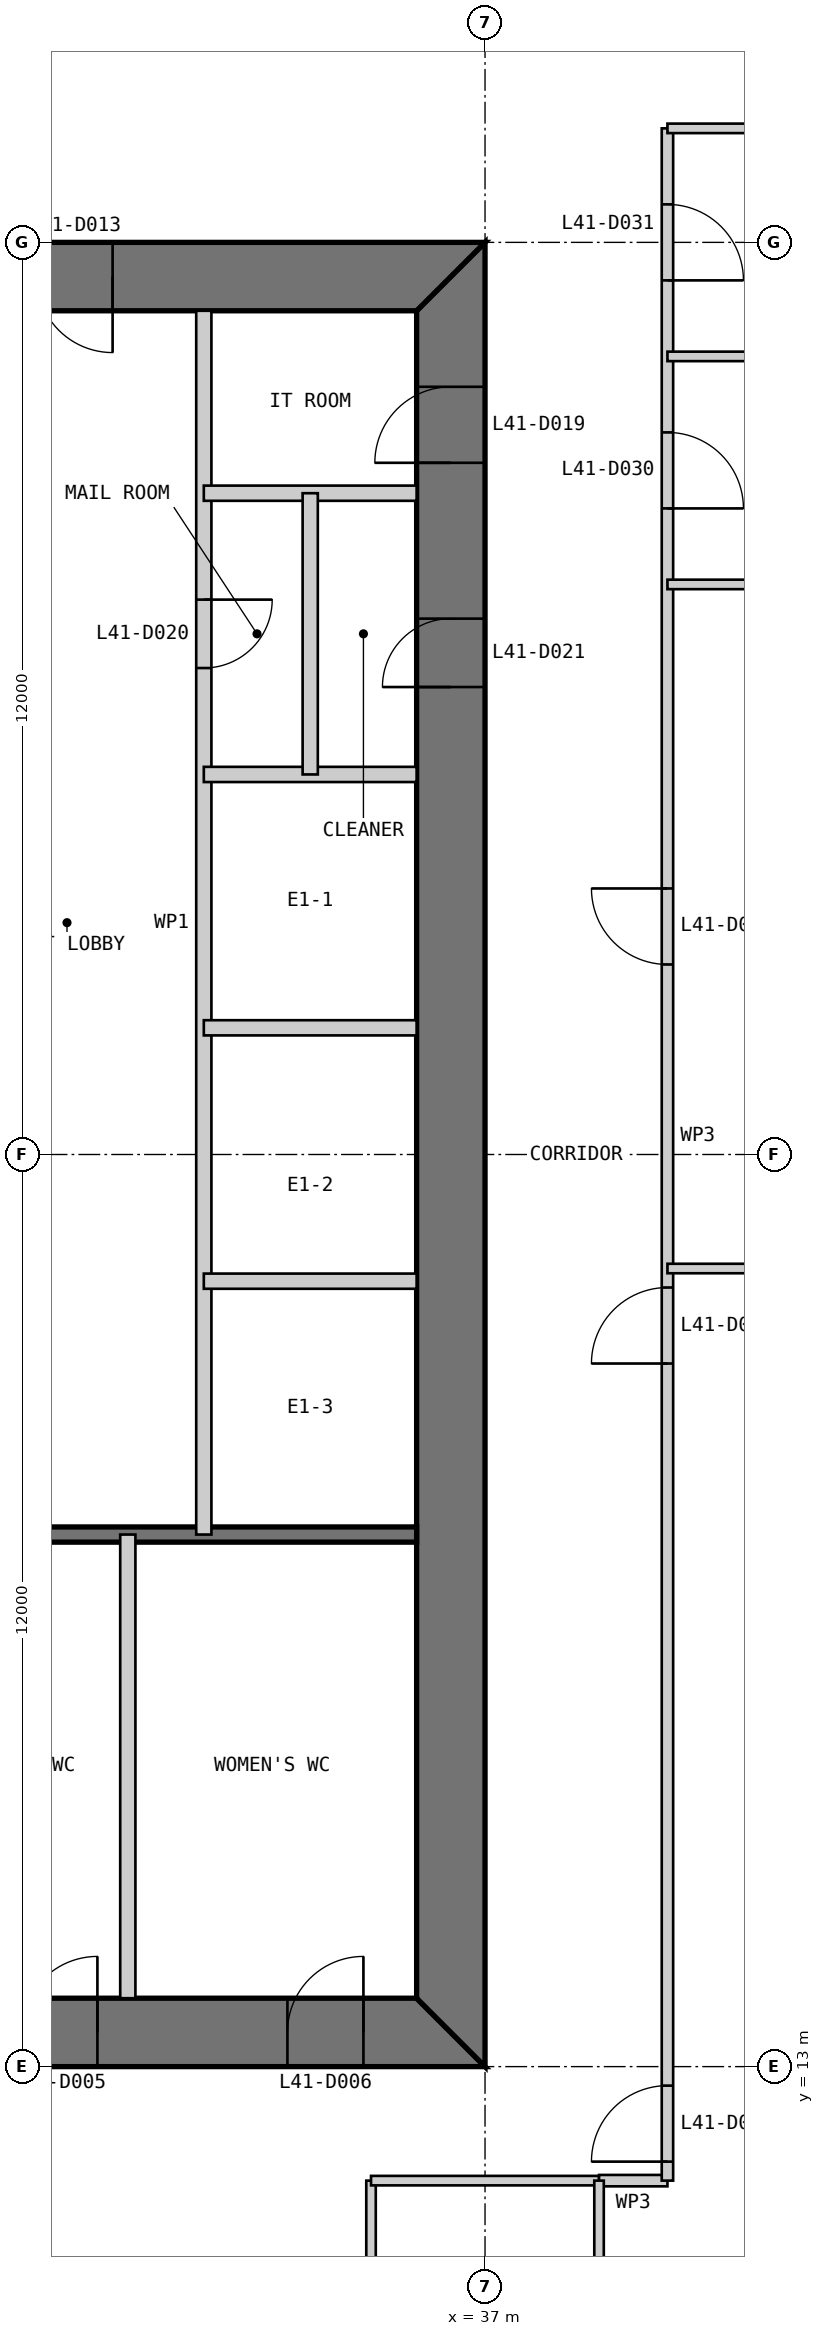
"""IFC4 building model, lengths in metres.
Left out: names, types, materials, properties, quantities, classifications, styles, units other than length and angle.
Written with IfcOpenShell. Run it as: python <this file> out.ifc"""

import sys

from ifc_helpers import new_model, si_unit, direction, frame, frame_2d, origin, place, context, subcontext, project, spatial, polyline, rectangle, outline, extrude, element, fill, save


model = new_model("IFC4")
c1 = context("Model", 3, precision=1e-05, world=origin(), true_north=direction((0.0, 1.0)))
c2 = subcontext(c1, "Body", "Model", "MODEL_VIEW")
j1 = project(units=[si_unit("LENGTHUNIT", "METRE"), si_unit("PLANEANGLEUNIT", "RADIAN")], contexts=[c1])
p1 = place(None, origin())
s1 = spatial("IfcSite", under=j1, at=p1, CompositionType="ELEMENT")
p2 = place(p1, origin())
s2 = spatial("IfcBuilding", under=s1, at=p2, CompositionType="ELEMENT")
p3 = place(p2, frame((0.0, 0.0, 177.8)))
s3 = spatial("IfcBuildingStorey", under=s2, at=p3, CompositionType="ELEMENT", Elevation=177.8)
p4 = place(p3, frame((13.0, 13.45, 0.0), z_axis=(0.0, 0.0, 1.0), x_axis=(1.0, 0.0, 0.0)))
e1 = element("IfcWall", 1, at=p4, inside=s3, PredefinedType="SHEAR", context=c2, shape_type="SweptSolid", body=[
    extrude(outline(polyline([(0.0, -0.45), (24.0, -0.45), (23.1, 0.45), (0.9, 0.45), (0.0, -0.45)])), origin(), (0.0, 0.0, 1.0), 4.0),
])
p5 = place(p4, frame((4.9, 0.0, 0.0)))
e2 = element("IfcOpeningElement", 2, at=p5, cuts=e1, PredefinedType="OPENING", context=c2, shape_type="SweptSolid", body=[
    extrude(rectangle(XDim=1.0, YDim=2.2, at=frame_2d((0.5, 1.1))), frame((0.0, 0.46, 0.0), z_axis=(0.0, -1.0, 0.0), x_axis=(1.0, 0.0, 0.0)), (0.0, 0.0, 1.0), 0.92),
])
p6 = place(p4, frame((8.9, 0.0, 0.0)))
e3 = element("IfcOpeningElement", 3, at=p6, cuts=e1, PredefinedType="OPENING", context=c2, shape_type="SweptSolid", body=[
    extrude(rectangle(XDim=1.1, YDim=2.2, at=frame_2d((0.55, 1.1))), frame((0.0, 0.46, 0.0), z_axis=(0.0, -1.0, 0.0), x_axis=(1.0, 0.0, 0.0)), (0.0, 0.0, 1.0), 0.92),
])
p7 = place(p4, frame((15.05, 0.0, 0.0)))
e4 = element("IfcOpeningElement", 4, at=p7, cuts=e1, PredefinedType="OPENING", context=c2, shape_type="SweptSolid", body=[
    extrude(rectangle(XDim=0.9, YDim=2.2, at=frame_2d((0.45, 1.1))), frame((0.0, 0.46, 0.0), z_axis=(0.0, -1.0, 0.0), x_axis=(1.0, 0.0, 0.0)), (0.0, 0.0, 1.0), 0.92),
])
p8 = place(p4, frame((17.9, 0.0, 0.0)))
e5 = element("IfcOpeningElement", 5, at=p8, cuts=e1, PredefinedType="OPENING", context=c2, shape_type="SweptSolid", body=[
    extrude(rectangle(XDim=1.0, YDim=2.2, at=frame_2d((0.5, 1.1))), frame((0.0, 0.46, 0.0), z_axis=(0.0, -1.0, 0.0), x_axis=(1.0, 0.0, 0.0)), (0.0, 0.0, 1.0), 0.92),
])
p9 = place(p4, frame((21.4, 0.0, 0.0)))
e6 = element("IfcOpeningElement", 6, at=p9, cuts=e1, PredefinedType="OPENING", context=c2, shape_type="SweptSolid", body=[
    extrude(rectangle(XDim=1.0, YDim=2.2, at=frame_2d((0.5, 1.1))), frame((0.0, 0.46, 0.0), z_axis=(0.0, -1.0, 0.0), x_axis=(1.0, 0.0, 0.0)), (0.0, 0.0, 1.0), 0.92),
])
p10 = place(p3, frame((36.55, 13.9, 0.0), z_axis=(0.0, 0.0, 1.0), x_axis=(0.0, 1.0, 0.0)))
e7 = element("IfcWall", 7, at=p10, inside=s3, PredefinedType="SHEAR", context=c2, shape_type="SweptSolid", body=[
    extrude(outline(polyline([(-0.9, -0.45), (23.1, -0.45), (22.2, 0.45), (0.0, 0.45), (-0.9, -0.45)])), origin(), (0.0, 0.0, 1.0), 4.0),
])
p11 = place(p10, frame((20.2, 0.0, 0.0)))
e8 = element("IfcOpeningElement", 8, at=p11, cuts=e7, PredefinedType="OPENING", context=c2, shape_type="SweptSolid", body=[
    extrude(rectangle(XDim=1.0, YDim=2.2, at=frame_2d((0.5, 1.1))), frame((0.0, 0.46, 0.0), z_axis=(0.0, -1.0, 0.0), x_axis=(1.0, 0.0, 0.0)), (0.0, 0.0, 1.0), 0.92),
])
p12 = place(p10, frame((17.25, 0.0, 0.0)))
e9 = element("IfcOpeningElement", 9, at=p12, cuts=e7, PredefinedType="OPENING", context=c2, shape_type="SweptSolid", body=[
    extrude(rectangle(XDim=0.9, YDim=2.2, at=frame_2d((0.45, 1.1))), frame((0.0, 0.46, 0.0), z_axis=(0.0, -1.0, 0.0), x_axis=(1.0, 0.0, 0.0)), (0.0, 0.0, 1.0), 0.92),
])
p13 = place(p3, frame((37.0, 36.55, 0.0), z_axis=(0.0, 0.0, 1.0), x_axis=(-1.0, 0.0, 0.0)))
e10 = element("IfcWall", 10, at=p13, inside=s3, PredefinedType="SHEAR", context=c2, shape_type="SweptSolid", body=[
    extrude(outline(polyline([(0.0, -0.45), (24.0, -0.45), (23.1, 0.45), (0.9, 0.45), (0.0, -0.45)])), origin(), (0.0, 0.0, 1.0), 4.0),
])
p14 = place(p13, frame((4.9, 0.0, 0.0)))
e11 = element("IfcOpeningElement", 11, at=p14, cuts=e10, PredefinedType="OPENING", context=c2, shape_type="SweptSolid", body=[
    extrude(rectangle(XDim=1.0, YDim=2.2, at=frame_2d((0.5, 1.1))), frame((0.0, 0.46, 0.0), z_axis=(0.0, -1.0, 0.0), x_axis=(1.0, 0.0, 0.0)), (0.0, 0.0, 1.0), 0.92),
])
p15 = place(p13, frame((8.9, 0.0, 0.0)))
e12 = element("IfcOpeningElement", 12, at=p15, cuts=e10, PredefinedType="OPENING", context=c2, shape_type="SweptSolid", body=[
    extrude(rectangle(XDim=1.1, YDim=2.2, at=frame_2d((0.55, 1.1))), frame((0.0, 0.46, 0.0), z_axis=(0.0, -1.0, 0.0), x_axis=(1.0, 0.0, 0.0)), (0.0, 0.0, 1.0), 0.92),
])
p16 = place(p13, frame((15.05, 0.0, 0.0)))
e13 = element("IfcOpeningElement", 13, at=p16, cuts=e10, PredefinedType="OPENING", context=c2, shape_type="SweptSolid", body=[
    extrude(rectangle(XDim=0.9, YDim=2.2, at=frame_2d((0.45, 1.1))), frame((0.0, 0.46, 0.0), z_axis=(0.0, -1.0, 0.0), x_axis=(1.0, 0.0, 0.0)), (0.0, 0.0, 1.0), 0.92),
])
p17 = place(p13, frame((17.9, 0.0, 0.0)))
e14 = element("IfcOpeningElement", 14, at=p17, cuts=e10, PredefinedType="OPENING", context=c2, shape_type="SweptSolid", body=[
    extrude(rectangle(XDim=1.0, YDim=2.2, at=frame_2d((0.5, 1.1))), frame((0.0, 0.46, 0.0), z_axis=(0.0, -1.0, 0.0), x_axis=(1.0, 0.0, 0.0)), (0.0, 0.0, 1.0), 0.92),
])
p18 = place(p13, frame((21.4, 0.0, 0.0)))
e15 = element("IfcOpeningElement", 15, at=p18, cuts=e10, PredefinedType="OPENING", context=c2, shape_type="SweptSolid", body=[
    extrude(rectangle(XDim=1.0, YDim=2.2, at=frame_2d((0.5, 1.1))), frame((0.0, 0.46, 0.0), z_axis=(0.0, -1.0, 0.0), x_axis=(1.0, 0.0, 0.0)), (0.0, 0.0, 1.0), 0.92),
])
p19 = place(p3, frame((20.3, 20.0, 0.0), z_axis=(0.0, 0.0, 1.0), x_axis=(1.0, 0.0, 0.0)))
e16 = element("IfcWall", 16, at=p19, inside=s3, PredefinedType="SOLIDWALL", context=c2, shape_type="SweptSolid", body=[
    extrude(rectangle(XDim=15.8, YDim=0.2, at=frame_2d((7.9, 0.0))), origin(), (0.0, 0.0, 1.0), 3.8),
])
p20 = place(p3, frame((32.3, 13.9, 0.0), z_axis=(0.0, 0.0, 1.0), x_axis=(0.0, 1.0, 0.0)))
e17 = element("IfcWall", 17, at=p20, inside=s3, PredefinedType="PARTITIONING", context=c2, shape_type="SweptSolid", body=[
    extrude(rectangle(XDim=6.1, YDim=0.2, at=frame_2d((3.05, 0.0))), origin(), (0.0, 0.0, 1.0), 3.8),
])
p21 = place(p3, frame((33.3, 36.1, 0.0), z_axis=(0.0, 0.0, 1.0), x_axis=(0.0, -1.0, 0.0)))
e18 = element("IfcWall", 18, at=p21, inside=s3, PredefinedType="PARTITIONING", context=c2, shape_type="SweptSolid", body=[
    extrude(rectangle(XDim=16.1, YDim=0.2, at=frame_2d((8.05, 0.0))), origin(), (0.0, 0.0, 1.0), 3.8),
])
p22 = place(p21, frame((3.8, 0.0, 0.0)))
e19 = element("IfcOpeningElement", 19, at=p22, cuts=e18, PredefinedType="OPENING", context=c2, shape_type="SweptSolid", body=[
    extrude(rectangle(XDim=0.9, YDim=2.2, at=frame_2d((0.45, 1.1))), frame((0.0, 0.11, 0.0), z_axis=(0.0, -1.0, 0.0), x_axis=(1.0, 0.0, 0.0)), (0.0, 0.0, 1.0), 0.22),
])
for number, where, z_axis, x_axis in (
    (20, (36.1, 30.0, 0.0), (0.0, 0.0, 1.0), (-1.0, 0.0, 0.0)),
    (21, (36.1, 26.667, 0.0), (0.0, 0.0, 1.0), (-1.0, 0.0, 0.0)),
    (22, (36.1, 23.333, 0.0), (0.0, 0.0, 1.0), (-1.0, 0.0, 0.0)),
    (23, (36.1, 33.7, 0.0), (0.0, 0.0, 1.0), (-1.0, 0.0, 0.0)),
):
    element("IfcWall", number, at=place(p3, frame(where, z_axis=z_axis, x_axis=x_axis)), inside=s3, PredefinedType="PARTITIONING", context=c2, shape_type="SweptSolid", body=[
        extrude(rectangle(XDim=2.8, YDim=0.2, at=frame_2d((1.4, 0.0))), origin(), (0.0, 0.0, 1.0), 3.8),
    ])
p23 = place(p3, frame((34.7, 33.7, 0.0), z_axis=(0.0, 0.0, 1.0), x_axis=(0.0, -1.0, 0.0)))
e24 = element("IfcWall", 24, at=p23, inside=s3, PredefinedType="PARTITIONING", context=c2, shape_type="SweptSolid", body=[
    extrude(rectangle(XDim=3.7, YDim=0.2, at=frame_2d((1.85, 0.0))), origin(), (0.0, 0.0, 1.0), 3.8),
])
p24 = place(p3, frame((35.5, 4.0, 0.0), z_axis=(0.0, 0.0, 1.0), x_axis=(0.0, 1.0, 0.0)))
e25 = element("IfcWall", 25, at=p24, inside=s3, PredefinedType="PARTITIONING", context=c2, shape_type="SweptSolid", body=[
    extrude(rectangle(XDim=7.5, YDim=0.125, at=frame_2d((3.75, 0.0))), origin(), (0.0, 0.0, 1.0), 3.85),
])
p25 = place(p24, frame((3.3, 0.0, 0.0)))
e26 = element("IfcOpeningElement", 26, at=p25, cuts=e25, PredefinedType="OPENING", context=c2, shape_type="SweptSolid", body=[
    extrude(rectangle(XDim=0.9, YDim=2.2, at=frame_2d((0.45, 1.1))), frame((0.0, 0.073, 0.0), z_axis=(0.0, -1.0, 0.0), x_axis=(1.0, 0.0, 0.0)), (0.0, 0.0, 1.0), 0.145),
])
p26 = place(p3, frame((35.5, 11.5, 0.0), z_axis=(0.0, 0.0, 1.0), x_axis=(1.0, 0.0, 0.0)))
e27 = element("IfcWall", 27, at=p26, inside=s3, PredefinedType="PARTITIONING", context=c2, shape_type="SweptSolid", body=[
    extrude(rectangle(XDim=3.0, YDim=0.125, at=frame_2d((1.5, 0.0))), origin(), (0.0, 0.0, 1.0), 3.85),
])
p27 = place(p3, frame((38.5, 11.5, 0.0), z_axis=(0.0, 0.0, 1.0), x_axis=(1.0, 0.0, 0.0)))
e28 = element("IfcWall", 28, at=p27, inside=s3, PredefinedType="PARTITIONING", context=c2, shape_type="SweptSolid", body=[
    extrude(rectangle(XDim=0.9, YDim=0.15, at=frame_2d((0.45, 0.0))), origin(), (0.0, 0.0, 1.0), 3.85),
])
p28 = place(p3, frame((39.4, 11.5, 0.0), z_axis=(0.0, 0.0, 1.0), x_axis=(0.0, 1.0, 0.0)))
e29 = element("IfcWall", 29, at=p28, inside=s3, PredefinedType="PARTITIONING", context=c2, shape_type="SweptSolid", body=[
    extrude(rectangle(XDim=27.0, YDim=0.15, at=frame_2d((13.5, 0.0))), origin(), (0.0, 0.0, 1.0), 3.85),
])
p29 = place(p28, frame((16.0, 0.0, 0.0)))
e30 = element("IfcOpeningElement", 30, at=p29, cuts=e29, PredefinedType="OPENING", context=c2, shape_type="SweptSolid", body=[
    extrude(rectangle(XDim=1.0, YDim=2.2, at=frame_2d((0.5, 1.1))), frame((0.0, 0.085, 0.0), z_axis=(0.0, -1.0, 0.0), x_axis=(1.0, 0.0, 0.0)), (0.0, 0.0, 1.0), 0.17),
])
p30 = place(p28, frame((0.25, 0.0, 0.0)))
e31 = element("IfcOpeningElement", 31, at=p30, cuts=e29, PredefinedType="OPENING", context=c2, shape_type="SweptSolid", body=[
    extrude(rectangle(XDim=1.0, YDim=2.2, at=frame_2d((0.5, 1.1))), frame((0.0, 0.085, 0.0), z_axis=(0.0, -1.0, 0.0), x_axis=(1.0, 0.0, 0.0)), (0.0, 0.0, 1.0), 0.17),
])
p31 = place(p28, frame((10.75, 0.0, 0.0)))
e32 = element("IfcOpeningElement", 32, at=p31, cuts=e29, PredefinedType="OPENING", context=c2, shape_type="SweptSolid", body=[
    extrude(rectangle(XDim=1.0, YDim=2.2, at=frame_2d((0.5, 1.1))), frame((0.0, 0.085, 0.0), z_axis=(0.0, -1.0, 0.0), x_axis=(1.0, 0.0, 0.0)), (0.0, 0.0, 1.0), 0.17),
])
p32 = place(p28, frame((22.0, 0.0, 0.0)))
e33 = element("IfcOpeningElement", 33, at=p32, cuts=e29, PredefinedType="OPENING", context=c2, shape_type="SweptSolid", body=[
    extrude(rectangle(XDim=1.0, YDim=2.2, at=frame_2d((0.5, 1.1))), frame((0.0, 0.085, 0.0), z_axis=(0.0, -1.0, 0.0), x_axis=(1.0, 0.0, 0.0)), (0.0, 0.0, 1.0), 0.17),
])
p33 = place(p28, frame((25.0, 0.0, 0.0)))
e34 = element("IfcOpeningElement", 34, at=p33, cuts=e29, PredefinedType="OPENING", context=c2, shape_type="SweptSolid", body=[
    extrude(rectangle(XDim=1.0, YDim=2.2, at=frame_2d((0.5, 1.1))), frame((0.0, 0.085, 0.0), z_axis=(0.0, -1.0, 0.0), x_axis=(1.0, 0.0, 0.0)), (0.0, 0.0, 1.0), 0.17),
])
p34 = place(p3, frame((38.5, 0.15, 0.0), z_axis=(0.0, 0.0, 1.0), x_axis=(0.0, 1.0, 0.0)))
e35 = element("IfcWall", 35, at=p34, inside=s3, PredefinedType="PARTITIONING", context=c2, shape_type="SweptSolid", body=[
    extrude(rectangle(XDim=11.35, YDim=0.125, at=frame_2d((5.675, 0.0))), origin(), (0.0, 0.0, 1.0), 3.85),
])
p35 = place(p3, frame((46.0, 23.5, 0.0), z_axis=(0.0, 0.0, 1.0), x_axis=(-1.0, 0.0, 0.0)))
e36 = element("IfcWall", 36, at=p35, inside=s3, PredefinedType="PARTITIONING", context=c2, shape_type="SweptSolid", body=[
    extrude(rectangle(XDim=6.6, YDim=0.125, at=frame_2d((3.3, 0.0))), origin(), (0.0, 0.0, 1.0), 3.85),
])
p36 = place(p3, frame((49.85, 32.5, 0.0), z_axis=(0.0, 0.0, 1.0), x_axis=(-1.0, 0.0, 0.0)))
e37 = element("IfcWall", 37, at=p36, inside=s3, PredefinedType="PARTITIONING", context=c2, shape_type="SweptSolid", body=[
    extrude(rectangle(XDim=10.45, YDim=0.125, at=frame_2d((5.225, 0.0))), origin(), (0.0, 0.0, 1.0), 3.85),
])
p37 = place(p3, frame((46.0, 35.5, 0.0), z_axis=(0.0, 0.0, 1.0), x_axis=(-1.0, 0.0, 0.0)))
e38 = element("IfcWall", 38, at=p37, inside=s3, PredefinedType="PARTITIONING", context=c2, shape_type="SweptSolid", body=[
    extrude(rectangle(XDim=6.6, YDim=0.125, at=frame_2d((3.3, 0.0))), origin(), (0.0, 0.0, 1.0), 3.85),
])
p38 = place(p3, frame((49.85, 38.5, 0.0), z_axis=(0.0, 0.0, 1.0), x_axis=(-1.0, 0.0, 0.0)))
e39 = element("IfcWall", 39, at=p38, inside=s3, PredefinedType="PARTITIONING", context=c2, shape_type="SweptSolid", body=[
    extrude(rectangle(XDim=10.45, YDim=0.125, at=frame_2d((5.225, 0.0))), origin(), (0.0, 0.0, 1.0), 3.85),
])
p39 = place(p8, origin())
e40 = element("IfcDoor", 40, at=p39, inside=s3, OperationType="SINGLE_SWING_RIGHT", PredefinedType="DOOR", context=c2, shape_type="SweptSolid", body=[
    extrude(rectangle(XDim=1.0, YDim=2.2, at=frame_2d((0.5, 1.1))), frame((0.0, 0.025, 0.0), z_axis=(0.0, -1.0, 0.0), x_axis=(1.0, 0.0, 0.0)), (0.0, 0.0, 1.0), 0.05),
    extrude(outline(polyline([(0.0, 0.0), (0.04, 0.0), (0.04, 2.16), (0.96, 2.16), (0.96, 0.0), (1.0, 0.0), (1.0, 2.2), (0.0, 2.2), (0.0, 0.0)])), frame((0.0, 0.3, 0.0), z_axis=(0.0, -1.0, 0.0), x_axis=(1.0, 0.0, 0.0)), (0.0, 0.0, 1.0), 0.6),
])
fill(e5, e40)
p40 = place(p9, origin())
e41 = element("IfcDoor", 41, at=p40, inside=s3, OperationType="SINGLE_SWING_RIGHT", PredefinedType="DOOR", context=c2, shape_type="SweptSolid", body=[
    extrude(rectangle(XDim=1.0, YDim=2.2, at=frame_2d((0.5, 1.1))), frame((0.0, 0.025, 0.0), z_axis=(0.0, -1.0, 0.0), x_axis=(1.0, 0.0, 0.0)), (0.0, 0.0, 1.0), 0.05),
    extrude(outline(polyline([(0.0, 0.0), (0.04, 0.0), (0.04, 2.16), (0.96, 2.16), (0.96, 0.0), (1.0, 0.0), (1.0, 2.2), (0.0, 2.2), (0.0, 0.0)])), frame((0.0, 0.3, 0.0), z_axis=(0.0, -1.0, 0.0), x_axis=(1.0, 0.0, 0.0)), (0.0, 0.0, 1.0), 0.6),
])
fill(e6, e41)
p41 = place(p14, origin())
e42 = element("IfcDoor", 42, at=p41, inside=s3, OperationType="SINGLE_SWING_LEFT", PredefinedType="DOOR", context=c2, shape_type="SweptSolid", body=[
    extrude(rectangle(XDim=1.0, YDim=2.2, at=frame_2d((0.5, 1.1))), frame((0.0, 0.025, 0.0), z_axis=(0.0, -1.0, 0.0), x_axis=(1.0, 0.0, 0.0)), (0.0, 0.0, 1.0), 0.05),
    extrude(outline(polyline([(0.0, 0.0), (0.04, 0.0), (0.04, 2.16), (0.96, 2.16), (0.96, 0.0), (1.0, 0.0), (1.0, 2.2), (0.0, 2.2), (0.0, 0.0)])), frame((0.0, 0.3, 0.0), z_axis=(0.0, -1.0, 0.0), x_axis=(1.0, 0.0, 0.0)), (0.0, 0.0, 1.0), 0.6),
])
fill(e11, e42)
p42 = place(p11, origin())
e43 = element("IfcDoor", 43, at=p42, inside=s3, OperationType="SINGLE_SWING_LEFT", PredefinedType="DOOR", context=c2, shape_type="SweptSolid", body=[
    extrude(rectangle(XDim=1.0, YDim=2.2, at=frame_2d((0.5, 1.1))), frame((0.0, 0.025, 0.0), z_axis=(0.0, -1.0, 0.0), x_axis=(1.0, 0.0, 0.0)), (0.0, 0.0, 1.0), 0.05),
    extrude(outline(polyline([(0.0, 0.0), (0.04, 0.0), (0.04, 2.16), (0.96, 2.16), (0.96, 0.0), (1.0, 0.0), (1.0, 2.2), (0.0, 2.2), (0.0, 0.0)])), frame((0.0, 0.3, 0.0), z_axis=(0.0, -1.0, 0.0), x_axis=(1.0, 0.0, 0.0)), (0.0, 0.0, 1.0), 0.6),
])
fill(e8, e43)
p43 = place(p22, origin())
e44 = element("IfcDoor", 44, at=p43, inside=s3, OperationType="SINGLE_SWING_LEFT", PredefinedType="DOOR", context=c2, shape_type="SweptSolid", body=[
    extrude(rectangle(XDim=0.9, YDim=2.2, at=frame_2d((0.45, 1.1))), frame((0.0, 0.025, 0.0), z_axis=(0.0, -1.0, 0.0), x_axis=(1.0, 0.0, 0.0)), (0.0, 0.0, 1.0), 0.05),
])
fill(e19, e44)
p44 = place(p12, origin())
e45 = element("IfcDoor", 45, at=p44, inside=s3, OperationType="SINGLE_SWING_LEFT", PredefinedType="DOOR", context=c2, shape_type="SweptSolid", body=[
    extrude(rectangle(XDim=0.9, YDim=2.2, at=frame_2d((0.45, 1.1))), frame((0.0, 0.025, 0.0), z_axis=(0.0, -1.0, 0.0), x_axis=(1.0, 0.0, 0.0)), (0.0, 0.0, 1.0), 0.05),
    extrude(outline(polyline([(0.0, 0.0), (0.04, 0.0), (0.04, 2.16), (0.86, 2.16), (0.86, 0.0), (0.9, 0.0), (0.9, 2.2), (0.0, 2.2), (0.0, 0.0)])), frame((0.0, 0.3, 0.0), z_axis=(0.0, -1.0, 0.0), x_axis=(1.0, 0.0, 0.0)), (0.0, 0.0, 1.0), 0.6),
])
fill(e9, e45)
p45 = place(p29, origin())
e46 = element("IfcDoor", 46, at=p45, inside=s3, OperationType="SINGLE_SWING_RIGHT", PredefinedType="DOOR", context=c2, shape_type="SweptSolid", body=[
    extrude(rectangle(XDim=1.0, YDim=2.2, at=frame_2d((0.5, 1.1))), frame((0.0, 0.025, 0.0), z_axis=(0.0, -1.0, 0.0), x_axis=(1.0, 0.0, 0.0)), (0.0, 0.0, 1.0), 0.05),
])
fill(e30, e46)
p46 = place(p30, origin())
e47 = element("IfcDoor", 47, at=p46, inside=s3, OperationType="SINGLE_SWING_LEFT", PredefinedType="DOOR", context=c2, shape_type="SweptSolid", body=[
    extrude(rectangle(XDim=1.0, YDim=2.2, at=frame_2d((0.5, 1.1))), frame((0.0, 0.025, 0.0), z_axis=(0.0, -1.0, 0.0), x_axis=(1.0, 0.0, 0.0)), (0.0, 0.0, 1.0), 0.05),
])
fill(e31, e47)
p47 = place(p31, origin())
e48 = element("IfcDoor", 48, at=p47, inside=s3, OperationType="SINGLE_SWING_LEFT", PredefinedType="DOOR", context=c2, shape_type="SweptSolid", body=[
    extrude(rectangle(XDim=1.0, YDim=2.2, at=frame_2d((0.5, 1.1))), frame((0.0, 0.025, 0.0), z_axis=(0.0, -1.0, 0.0), x_axis=(1.0, 0.0, 0.0)), (0.0, 0.0, 1.0), 0.05),
])
fill(e32, e48)
p48 = place(p32, frame((1.0, 0.0, 0.0), z_axis=(0.0, 0.0, 1.0), x_axis=(-1.0, 0.0, 0.0)))
e49 = element("IfcDoor", 49, at=p48, inside=s3, OperationType="SINGLE_SWING_RIGHT", PredefinedType="DOOR", context=c2, shape_type="SweptSolid", body=[
    extrude(rectangle(XDim=1.0, YDim=2.2, at=frame_2d((0.5, 1.1))), frame((0.0, 0.025, 0.0), z_axis=(0.0, -1.0, 0.0), x_axis=(1.0, 0.0, 0.0)), (0.0, 0.0, 1.0), 0.05),
])
fill(e33, e49)
p49 = place(p33, frame((1.0, 0.0, 0.0), z_axis=(0.0, 0.0, 1.0), x_axis=(-1.0, 0.0, 0.0)))
e50 = element("IfcDoor", 50, at=p49, inside=s3, OperationType="SINGLE_SWING_RIGHT", PredefinedType="DOOR", context=c2, shape_type="SweptSolid", body=[
    extrude(rectangle(XDim=1.0, YDim=2.2, at=frame_2d((0.5, 1.1))), frame((0.0, 0.025, 0.0), z_axis=(0.0, -1.0, 0.0), x_axis=(1.0, 0.0, 0.0)), (0.0, 0.0, 1.0), 0.05),
])
fill(e34, e50)
save(model, sys.argv[1])
